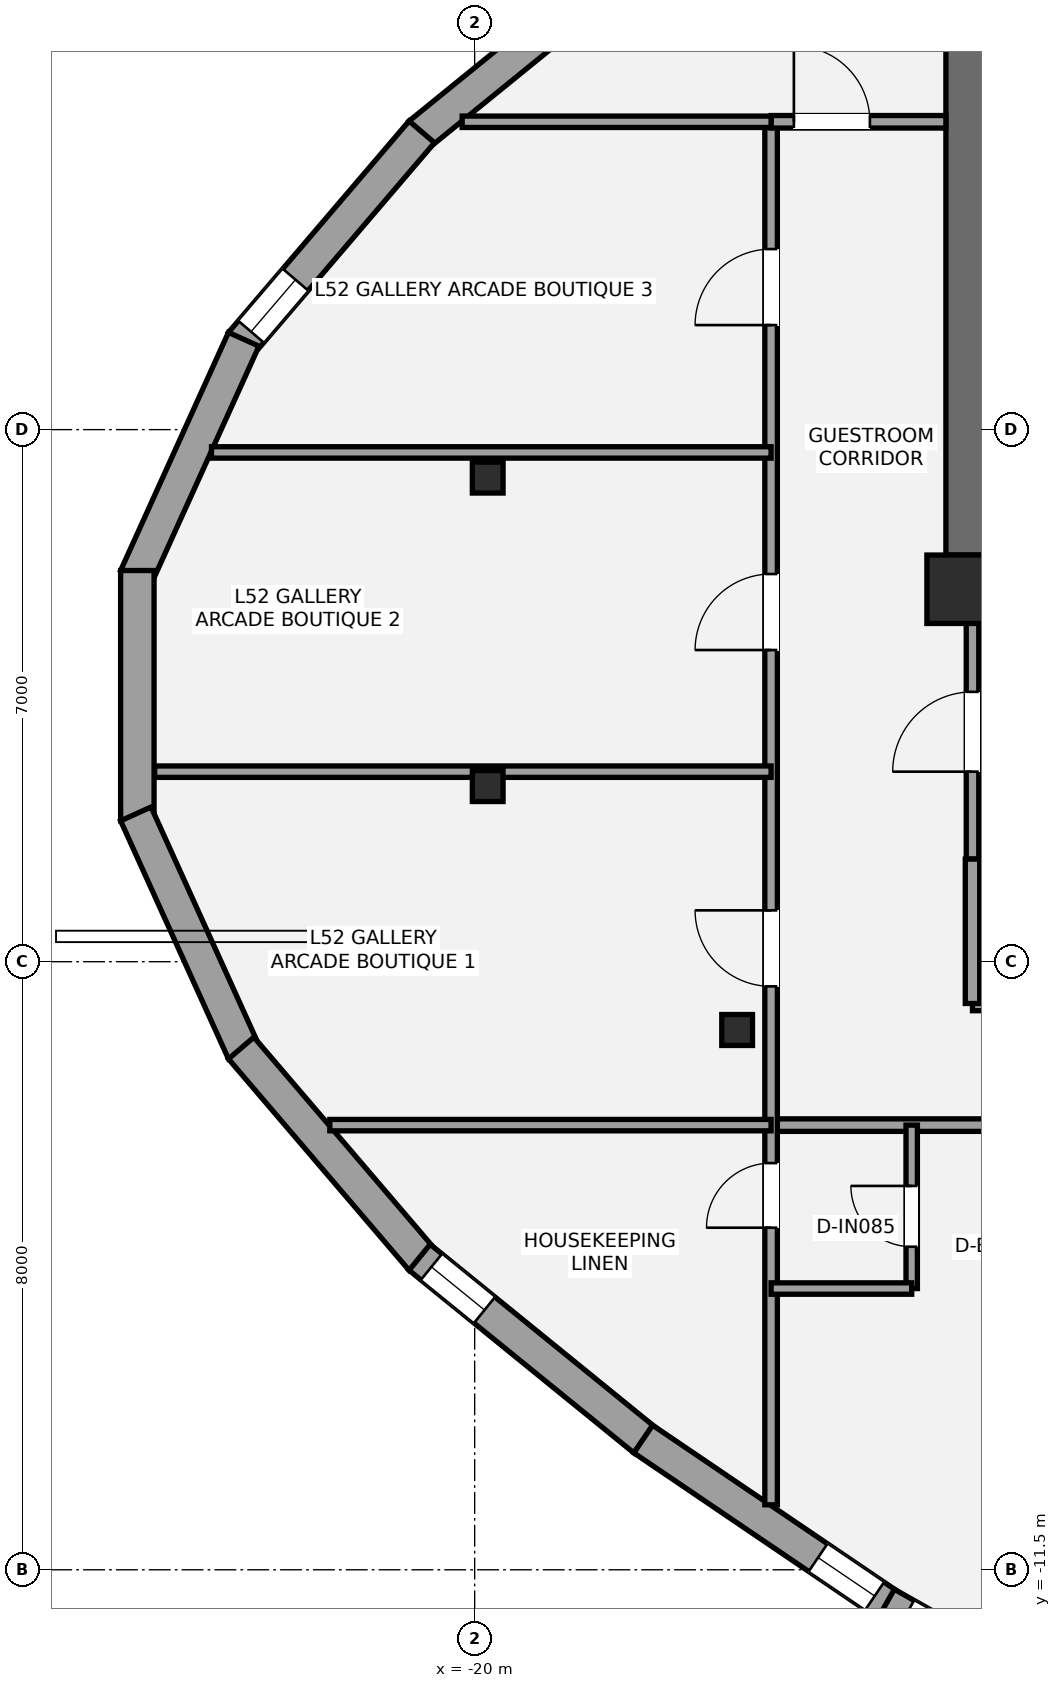
"""IFC4 building model, lengths in metres.
Left out: names, types, materials, properties, quantities, classifications, styles, units other than length and angle.
Written with IfcOpenShell. Run it as: python <this file> out.ifc"""

import sys

from ifc_helpers import new_model, si_unit, direction, frame, frame_2d, origin, origin_2d, place, context, subcontext, project, spatial, rectangle, i_section, extrude, element, fill, save


model = new_model("IFC4")
c1 = context("Model", 3, precision=1e-05, world=origin(), true_north=direction((0.0, 1.0)))
c2 = subcontext(c1, "Body", "Model", "MODEL_VIEW")
j1 = project(units=[si_unit("LENGTHUNIT", "METRE"), si_unit("PLANEANGLEUNIT", "RADIAN")], contexts=[c1])
p1 = place(None, origin())
s1 = spatial("IfcSite", under=j1, at=p1, CompositionType="ELEMENT")
p2 = place(p1, origin())
s2 = spatial("IfcBuilding", under=s1, at=p2, CompositionType="ELEMENT")
p3 = place(p2, frame((0.0, 0.0, 188.6)))
s3 = spatial("IfcBuildingStorey", under=s2, at=p3, CompositionType="ELEMENT", Elevation=188.6)
p4 = place(p3, frame((-13.475, 1.2, 0.0), z_axis=(0.0, 0.0, 1.0), x_axis=(0.0, 1.0, 0.0)))
e1 = element("IfcWall", 1, at=p4, inside=s3, PredefinedType="SHEAR", context=c2, shape_type="SweptSolid", body=[
    extrude(rectangle(XDim=8.45, YDim=0.65, at=frame_2d((4.225, 0.0))), origin(), (0.0, 0.0, 1.0), 3.2),
])
p5 = place(p3, frame((-4.875, 1.525, 0.0), z_axis=(0.0, 0.0, 1.0), x_axis=(-1.0, 0.0, 0.0)))
e2 = element("IfcWall", 2, at=p5, inside=s3, PredefinedType="SHEAR", context=c2, shape_type="SweptSolid", body=[
    extrude(rectangle(XDim=8.925, YDim=0.65, at=frame_2d((4.462, 0.0))), origin(), (0.0, 0.0, 1.0), 3.2),
])
p6 = place(p5, frame((5.425, 0.0, 0.0)))
e3 = element("IfcOpeningElement", 3, at=p6, cuts=e2, PredefinedType="OPENING", context=c2, shape_type="SweptSolid", body=[
    extrude(rectangle(XDim=1.05, YDim=2.15, at=frame_2d((0.525, 1.075))), frame((0.0, 0.335, 0.0), z_axis=(0.0, -1.0, 0.0), x_axis=(1.0, 0.0, 0.0)), (0.0, 0.0, 1.0), 0.67),
])
p7 = place(p5, frame((3.755, 0.0, 0.0)))
e4 = element("IfcOpeningElement", 4, at=p7, cuts=e2, PredefinedType="OPENING", context=c2, shape_type="SweptSolid", body=[
    extrude(rectangle(XDim=1.1, YDim=2.2, at=frame_2d((0.55, 1.1))), frame((0.0, 0.335, 0.0), z_axis=(0.0, -1.0, 0.0), x_axis=(1.0, 0.0, 0.0)), (0.0, 0.0, 1.0), 0.67),
])
p8 = place(p3, frame((-13.6, 1.4, 0.0), z_axis=(0.0, 0.0, 1.0), x_axis=(1.0, 0.0, 0.0)))
e5 = element("IfcColumn", 5, at=p8, inside=s3, PredefinedType="COLUMN", context=c2, shape_type="SweptSolid", body=[
    extrude(rectangle(XDim=0.9, YDim=0.9, at=origin_2d()), origin(), (0.0, 0.0, 1.0), 3.2),
])
for number, where, z_axis, x_axis in (
    (6, (-19.828, 2.869, 0.0), (0.0, 0.0, 1.0), (1.0, 0.0, 0.0)),
    (7, (-19.828, -1.189, 0.0), (0.0, 0.0, 1.0), (1.0, 0.0, 0.0)),
    (8, (-16.547, -4.398, 0.0), (0.0, 0.0, 1.0), (1.0, 0.0, 0.0)),
):
    element("IfcColumn", number, at=place(p3, frame(where, z_axis=z_axis, x_axis=x_axis)), inside=s3, PredefinedType="COLUMN", context=c2, shape_type="SweptSolid", body=[
        extrude(i_section(OverallWidth=0.404, OverallDepth=0.407, WebThickness=0.027, FlangeThickness=0.044, at=origin_2d()), origin(), (0.0, 0.0, 1.0), 3.2),
    ])
p9 = place(p3, frame((-20.724, 7.389, 0.0), z_axis=(0.0, 0.0, 1.0), x_axis=(0.776145361002, 0.63055402512, 0.0)))
e9 = element("IfcWall", 9, at=p9, inside=s3, PredefinedType="STANDARD", context=c2, shape_type="SweptSolid", body=[
    extrude(rectangle(XDim=3.81, YDim=0.44, at=frame_2d((1.905, 0.0))), origin(), (0.0, 0.0, 1.0), 2.315),
])
p10 = place(p9, frame((2.71, 0.0, 0.42)))
e10 = element("IfcOpeningElement", 10, at=p10, cuts=e9, PredefinedType="OPENING", context=c2, shape_type="SweptSolid", body=[
    extrude(rectangle(XDim=0.9, YDim=1.35, at=frame_2d((0.45, 0.675))), frame((0.0, 0.23, 0.0), z_axis=(0.0, -1.0, 0.0), x_axis=(1.0, 0.0, 0.0)), (0.0, 0.0, 1.0), 0.46),
])
p11 = place(p3, frame((-23.072, 4.636, 0.0), z_axis=(0.0, 0.0, 1.0), x_axis=(0.649641806751, 0.760240437573, 0.0)))
e11 = element("IfcWall", 11, at=p11, inside=s3, PredefinedType="STANDARD", context=c2, shape_type="SweptSolid", body=[
    extrude(rectangle(XDim=3.658, YDim=0.44, at=frame_2d((1.829, 0.0))), origin(), (0.0, 0.0, 1.0), 2.315),
])
p12 = place(p11, frame((0.2, 0.0, 0.42)))
e12 = element("IfcOpeningElement", 12, at=p12, cuts=e11, PredefinedType="OPENING", context=c2, shape_type="SweptSolid", body=[
    extrude(rectangle(XDim=0.9, YDim=1.35, at=frame_2d((0.45, 0.675))), frame((0.0, 0.23, 0.0), z_axis=(0.0, -1.0, 0.0), x_axis=(1.0, 0.0, 0.0)), (0.0, 0.0, 1.0), 0.46),
])
p13 = place(p3, frame((-24.458, 1.556, 0.0), z_axis=(0.0, 0.0, 1.0), x_axis=(0.412583132773, 0.91091995178, 0.0)))
e13 = element("IfcWall", 13, at=p13, inside=s3, PredefinedType="STANDARD", context=c2, shape_type="SweptSolid", body=[
    extrude(rectangle(XDim=3.439, YDim=0.44, at=frame_2d((1.72, 0.0))), origin(), (0.0, 0.0, 1.0), 2.315),
])
p14 = place(p3, frame((-24.438, -1.646, 0.0), z_axis=(0.0, 0.0, 1.0), x_axis=(0.0, 1.0, 0.0)))
e14 = element("IfcWall", 14, at=p14, inside=s3, PredefinedType="STANDARD", context=c2, shape_type="SweptSolid", body=[
    extrude(rectangle(XDim=3.293, YDim=0.44, at=frame_2d((1.646, 0.0))), origin(), (0.0, 0.0, 1.0), 2.315),
])
p15 = place(p3, frame((-23.039, -4.688, 0.0), z_axis=(0.0, 0.0, 1.0), x_axis=(-0.412583132773, 0.91091995178, 0.0)))
e15 = element("IfcWall", 15, at=p15, inside=s3, PredefinedType="STANDARD", context=c2, shape_type="SweptSolid", body=[
    extrude(rectangle(XDim=3.439, YDim=0.44, at=frame_2d((1.72, 0.0))), origin(), (0.0, 0.0, 1.0), 2.315),
])
p16 = place(p3, frame((-20.696, -7.417, 0.0), z_axis=(0.0, 0.0, 1.0), x_axis=(-0.649641806751, 0.760240437573, 0.0)))
e16 = element("IfcWall", 16, at=p16, inside=s3, PredefinedType="STANDARD", context=c2, shape_type="SweptSolid", body=[
    extrude(rectangle(XDim=3.658, YDim=0.44, at=frame_2d((1.829, 0.0))), origin(), (0.0, 0.0, 1.0), 2.315),
])
p17 = place(p3, frame((-17.767, -9.792, 0.0), z_axis=(0.0, 0.0, 1.0), x_axis=(-0.776145361002, 0.63055402512, 0.0)))
e17 = element("IfcWall", 17, at=p17, inside=s3, PredefinedType="STANDARD", context=c2, shape_type="SweptSolid", body=[
    extrude(rectangle(XDim=3.81, YDim=0.44, at=frame_2d((1.905, 0.0))), origin(), (0.0, 0.0, 1.0), 2.315),
])
p18 = place(p17, frame((2.71, 0.0, 0.58)))
e18 = element("IfcOpeningElement", 18, at=p18, cuts=e17, PredefinedType="OPENING", context=c2, shape_type="SweptSolid", body=[
    extrude(rectangle(XDim=0.9, YDim=1.35, at=frame_2d((0.45, 0.675))), frame((0.0, 0.23, 0.0), z_axis=(0.0, -1.0, 0.0), x_axis=(1.0, 0.0, 0.0)), (0.0, 0.0, 1.0), 0.46),
])
p19 = place(p3, frame((-14.571, -11.957, 0.0), z_axis=(0.0, 0.0, 1.0), x_axis=(-0.82772633423, 0.56113199483, 0.0)))
e19 = element("IfcWall", 19, at=p19, inside=s3, PredefinedType="STANDARD", context=c2, shape_type="SweptSolid", body=[
    extrude(rectangle(XDim=3.879, YDim=0.44, at=frame_2d((1.939, 0.0))), origin(), (0.0, 0.0, 1.0), 2.315),
])
p20 = place(p19, frame((0.2, 0.0, 0.58)))
e20 = element("IfcOpeningElement", 20, at=p20, cuts=e19, PredefinedType="OPENING", context=c2, shape_type="SweptSolid", body=[
    extrude(rectangle(XDim=0.9, YDim=1.35, at=frame_2d((0.45, 0.675))), frame((0.0, 0.23, 0.0), z_axis=(0.0, -1.0, 0.0), x_axis=(1.0, 0.0, 0.0)), (0.0, 0.0, 1.0), 0.46),
])
p21 = place(p3, frame((-11.043, -13.952, 0.0), z_axis=(0.0, 0.0, 1.0), x_axis=(-0.870346086449, 0.492440544434, 0.0)))
e21 = element("IfcWall", 21, at=p21, inside=s3, PredefinedType="STANDARD", context=c2, shape_type="SweptSolid", body=[
    extrude(rectangle(XDim=4.071, YDim=0.44, at=frame_2d((2.036, 0.0))), origin(), (0.0, 0.0, 1.0), 2.315),
])
p22 = place(p21, frame((2.872, 0.0, 0.58)))
e22 = element("IfcOpeningElement", 22, at=p22, cuts=e21, PredefinedType="OPENING", context=c2, shape_type="SweptSolid", body=[
    extrude(rectangle(XDim=0.9, YDim=1.35, at=frame_2d((0.45, 0.675))), frame((0.0, 0.23, 0.0), z_axis=(0.0, -1.0, 0.0), x_axis=(1.0, 0.0, 0.0)), (0.0, 0.0, 1.0), 0.46),
])
p23 = place(p3, frame((-13.45, -2.15, 0.0), z_axis=(0.0, 0.0, 1.0), x_axis=(1.0, 0.0, 0.0)))
e23 = element("IfcWall", 23, at=p23, inside=s3, PredefinedType="PARTITIONING", context=c2, shape_type="SweptSolid", body=[
    extrude(rectangle(XDim=6.25, YDim=0.165, at=frame_2d((3.125, 0.0))), origin(), (0.0, 0.0, 1.0), 3.02),
])
p24 = place(p3, frame((-13.45, -2.15, 0.0), z_axis=(0.0, 0.0, 1.0), x_axis=(0.0, 1.0, 0.0)))
e24 = element("IfcWall", 24, at=p24, inside=s3, PredefinedType="PARTITIONING", context=c2, shape_type="SweptSolid", body=[
    extrude(rectangle(XDim=3.4, YDim=0.165, at=frame_2d((1.7, 0.0))), origin(), (0.0, 0.0, 1.0), 2.473),
])
p25 = place(p24, frame((1.15, 0.0, 0.0)))
e25 = element("IfcOpeningElement", 25, at=p25, cuts=e24, PredefinedType="OPENING", context=c2, shape_type="SweptSolid", body=[
    extrude(rectangle(XDim=1.05, YDim=2.15, at=frame_2d((0.525, 1.075))), frame((0.0, 0.093, 0.0), z_axis=(0.0, -1.0, 0.0), x_axis=(1.0, 0.0, 0.0)), (0.0, 0.0, 1.0), 0.185),
])
p26 = place(p3, frame((-13.45, -4.05, 0.0), z_axis=(0.0, 0.0, 1.0), x_axis=(1.0, 0.0, 0.0)))
e26 = element("IfcWall", 26, at=p26, inside=s3, PredefinedType="PLUMBINGWALL", context=c2, shape_type="SweptSolid", body=[
    extrude(rectangle(XDim=11.35, YDim=0.19, at=frame_2d((5.675, 0.0))), origin(), (0.0, 0.0, 1.0), 2.473),
])
p27 = place(p26, frame((1.25, 0.0, 0.0)))
e27 = element("IfcOpeningElement", 27, at=p27, cuts=e26, PredefinedType="OPENING", context=c2, shape_type="SweptSolid", body=[
    extrude(rectangle(XDim=0.85, YDim=2.1, at=frame_2d((0.425, 1.05))), frame((0.0, 0.105, 0.0), z_axis=(0.0, -1.0, 0.0), x_axis=(1.0, 0.0, 0.0)), (0.0, 0.0, 1.0), 0.21),
])
p28 = place(p26, frame((5.1, 0.0, 0.0)))
e28 = element("IfcOpeningElement", 28, at=p28, cuts=e26, PredefinedType="OPENING", context=c2, shape_type="SweptSolid", body=[
    extrude(rectangle(XDim=0.85, YDim=2.1, at=frame_2d((0.425, 1.05))), frame((0.0, 0.105, 0.0), z_axis=(0.0, -1.0, 0.0), x_axis=(1.0, 0.0, 0.0)), (0.0, 0.0, 1.0), 0.21),
])
p29 = place(p26, frame((8.95, 0.0, 0.0)))
e29 = element("IfcOpeningElement", 29, at=p29, cuts=e26, PredefinedType="OPENING", context=c2, shape_type="SweptSolid", body=[
    extrude(rectangle(XDim=0.95, YDim=2.15, at=frame_2d((0.475, 1.075))), frame((0.0, 0.105, 0.0), z_axis=(0.0, -1.0, 0.0), x_axis=(1.0, 0.0, 0.0)), (0.0, 0.0, 1.0), 0.21),
])
p30 = place(p3, frame((-13.45, -4.05, 0.0), z_axis=(0.0, 0.0, 1.0), x_axis=(0.0, 1.0, 0.0)))
e30 = element("IfcWall", 30, at=p30, inside=s3, PredefinedType="PLUMBINGWALL", context=c2, shape_type="SweptSolid", body=[
    extrude(rectangle(XDim=1.9, YDim=0.19, at=frame_2d((0.95, 0.0))), origin(), (0.0, 0.0, 1.0), 2.473),
])
p31 = place(p3, frame((-16.1, -5.65, 0.0), z_axis=(0.0, 0.0, 1.0), x_axis=(1.0, 0.0, 0.0)))
e31 = element("IfcWall", 31, at=p31, inside=s3, PredefinedType="PARTITIONING", context=c2, shape_type="SweptSolid", body=[
    extrude(rectangle(XDim=31.65, YDim=0.165, at=frame_2d((15.825, 0.0))), origin(), (0.0, 0.0, 1.0), 2.398),
])
p32 = place(p31, frame((8.95, 0.0, 0.0)))
e32 = element("IfcOpeningElement", 32, at=p32, cuts=e31, PredefinedType="OPENING", context=c2, shape_type="SweptSolid", body=[
    extrude(rectangle(XDim=0.95, YDim=2.15, at=frame_2d((0.475, 1.075))), frame((0.0, 0.093, 0.0), z_axis=(0.0, -1.0, 0.0), x_axis=(1.0, 0.0, 0.0)), (0.0, 0.0, 1.0), 0.185),
])
p33 = place(p31, frame((18.95, 0.0, 0.0)))
e33 = element("IfcOpeningElement", 33, at=p33, cuts=e31, PredefinedType="OPENING", context=c2, shape_type="SweptSolid", body=[
    extrude(rectangle(XDim=0.95, YDim=2.15, at=frame_2d((0.475, 1.075))), frame((0.0, 0.093, 0.0), z_axis=(0.0, -1.0, 0.0), x_axis=(1.0, 0.0, 0.0)), (0.0, 0.0, 1.0), 0.185),
])
p34 = place(p31, frame((30.3, 0.0, 0.0)))
e34 = element("IfcOpeningElement", 34, at=p34, cuts=e31, PredefinedType="OPENING", context=c2, shape_type="SweptSolid", body=[
    extrude(rectangle(XDim=0.95, YDim=2.15, at=frame_2d((0.475, 1.075))), frame((0.0, 0.093, 0.0), z_axis=(0.0, -1.0, 0.0), x_axis=(1.0, 0.0, 0.0)), (0.0, 0.0, 1.0), 0.185),
])
p35 = place(p3, frame((-16.1, -10.645, 0.0), z_axis=(0.0, 0.0, 1.0), x_axis=(0.0, 1.0, 0.0)))
e35 = element("IfcWall", 35, at=p35, inside=s3, PredefinedType="PARTITIONING", context=c2, shape_type="SweptSolid", body=[
    extrude(rectangle(XDim=18.195, YDim=0.165, at=frame_2d((9.098, 0.0))), origin(), (0.0, 0.0, 1.0), 2.473),
])
p36 = place(p35, frame((3.646, 0.0, 0.0)))
e36 = element("IfcOpeningElement", 36, at=p36, cuts=e35, PredefinedType="OPENING", context=c2, shape_type="SweptSolid", body=[
    extrude(rectangle(XDim=0.85, YDim=2.1, at=frame_2d((0.425, 1.05))), frame((0.0, 0.093, 0.0), z_axis=(0.0, -1.0, 0.0), x_axis=(1.0, 0.0, 0.0)), (0.0, 0.0, 1.0), 0.185),
])
p37 = place(p35, frame((6.821, 0.0, 0.0)))
e37 = element("IfcOpeningElement", 37, at=p37, cuts=e35, PredefinedType="OPENING", context=c2, shape_type="SweptSolid", body=[
    extrude(rectangle(XDim=1.0, YDim=2.15, at=frame_2d((0.5, 1.075))), frame((0.0, 0.093, 0.0), z_axis=(0.0, -1.0, 0.0), x_axis=(1.0, 0.0, 0.0)), (0.0, 0.0, 1.0), 0.185),
])
p38 = place(p35, frame((11.246, 0.0, 0.0)))
e38 = element("IfcOpeningElement", 38, at=p38, cuts=e35, PredefinedType="OPENING", context=c2, shape_type="SweptSolid", body=[
    extrude(rectangle(XDim=1.0, YDim=2.15, at=frame_2d((0.5, 1.075))), frame((0.0, 0.093, 0.0), z_axis=(0.0, -1.0, 0.0), x_axis=(1.0, 0.0, 0.0)), (0.0, 0.0, 1.0), 0.185),
])
p39 = place(p35, frame((15.521, 0.0, 0.0)))
e39 = element("IfcOpeningElement", 39, at=p39, cuts=e35, PredefinedType="OPENING", context=c2, shape_type="SweptSolid", body=[
    extrude(rectangle(XDim=1.0, YDim=2.15, at=frame_2d((0.5, 1.075))), frame((0.0, 0.093, 0.0), z_axis=(0.0, -1.0, 0.0), x_axis=(1.0, 0.0, 0.0)), (0.0, 0.0, 1.0), 0.185),
])
p40 = place(p3, frame((-16.1, 7.55, 0.0), z_axis=(0.0, 0.0, 1.0), x_axis=(1.0, 0.0, 0.0)))
e40 = element("IfcWall", 40, at=p40, inside=s3, PredefinedType="PARTITIONING", context=c2, shape_type="SweptSolid", body=[
    extrude(rectangle(XDim=2.3, YDim=0.165, at=frame_2d((1.15, 0.0))), origin(), (0.0, 0.0, 1.0), 2.473),
])
p41 = place(p40, frame((0.3, 0.0, 0.0)))
e41 = element("IfcOpeningElement", 41, at=p41, cuts=e40, PredefinedType="OPENING", context=c2, shape_type="SweptSolid", body=[
    extrude(rectangle(XDim=1.0, YDim=2.15, at=frame_2d((0.5, 1.075))), frame((0.0, 0.093, 0.0), z_axis=(0.0, -1.0, 0.0), x_axis=(1.0, 0.0, 0.0)), (0.0, 0.0, 1.0), 0.185),
])
p42 = place(p3, frame((-20.165, 7.55, 0.0), z_axis=(0.0, 0.0, 1.0), x_axis=(1.0, 0.0, 0.0)))
e42 = element("IfcWall", 42, at=p42, inside=s3, PredefinedType="PLUMBINGWALL", context=c2, shape_type="SweptSolid", body=[
    extrude(rectangle(XDim=4.065, YDim=0.15, at=frame_2d((2.032, 0.0))), origin(), (0.0, 0.0, 1.0), 2.473),
])
p43 = place(p3, frame((-21.906, -5.65, 0.0), z_axis=(0.0, 0.0, 1.0), x_axis=(1.0, 0.0, 0.0)))
e43 = element("IfcWall", 43, at=p43, inside=s3, PredefinedType="PLUMBINGWALL", context=c2, shape_type="SweptSolid", body=[
    extrude(rectangle(XDim=5.806, YDim=0.15, at=frame_2d((2.903, 0.0))), origin(), (0.0, 0.0, 1.0), 2.473),
])
p44 = place(p3, frame((-14.25, -7.8, 0.0), z_axis=(0.0, 0.0, 1.0), x_axis=(0.0, 1.0, 0.0)))
e44 = element("IfcWall", 44, at=p44, inside=s3, PredefinedType="PLUMBINGWALL", context=c2, shape_type="SweptSolid", body=[
    extrude(rectangle(XDim=2.15, YDim=0.15, at=frame_2d((1.075, 0.0))), origin(), (0.0, 0.0, 1.0), 2.473),
])
p45 = place(p44, frame((0.55, 0.0, 0.0)))
e45 = element("IfcOpeningElement", 45, at=p45, cuts=e44, PredefinedType="OPENING", context=c2, shape_type="SweptSolid", body=[
    extrude(rectangle(XDim=0.8, YDim=2.1, at=frame_2d((0.4, 1.05))), frame((0.0, 0.085, 0.0), z_axis=(0.0, -1.0, 0.0), x_axis=(1.0, 0.0, 0.0)), (0.0, 0.0, 1.0), 0.17),
])
p46 = place(p3, frame((-16.1, -7.8, 0.0), z_axis=(0.0, 0.0, 1.0), x_axis=(1.0, 0.0, 0.0)))
e46 = element("IfcWall", 46, at=p46, inside=s3, PredefinedType="PLUMBINGWALL", context=c2, shape_type="SweptSolid", body=[
    extrude(rectangle(XDim=1.85, YDim=0.15, at=frame_2d((0.925, 0.0))), origin(), (0.0, 0.0, 1.0), 2.473),
])
p47 = place(p3, frame((-24.21, -1.0, 0.0), z_axis=(0.0, 0.0, 1.0), x_axis=(1.0, 0.0, 0.0)))
e47 = element("IfcWall", 47, at=p47, inside=s3, PredefinedType="PLUMBINGWALL", context=c2, shape_type="SweptSolid", body=[
    extrude(rectangle(XDim=8.11, YDim=0.15, at=frame_2d((4.055, 0.0))), origin(), (0.0, 0.0, 1.0), 2.473),
])
p48 = place(p3, frame((-23.463, 3.2, 0.0), z_axis=(0.0, 0.0, 1.0), x_axis=(1.0, 0.0, 0.0)))
e48 = element("IfcWall", 48, at=p48, inside=s3, PredefinedType="PLUMBINGWALL", context=c2, shape_type="SweptSolid", body=[
    extrude(rectangle(XDim=7.363, YDim=0.15, at=frame_2d((3.681, 0.0))), origin(), (0.0, 0.0, 1.0), 2.473),
])
p49 = place(p12, origin())
e49 = element("IfcWindow", 49, at=p49, inside=s3, PartitioningType="SINGLE_PANEL", PredefinedType="WINDOW", context=c2, shape_type="SweptSolid", body=[
    extrude(rectangle(XDim=0.9, YDim=1.35, at=frame_2d((0.45, 0.675))), frame((0.0, -0.01, 0.0), z_axis=(0.0, -1.0, 0.0), x_axis=(1.0, 0.0, 0.0)), (0.0, 0.0, 1.0), 0.06),
])
fill(e12, e49)
p50 = place(p18, origin())
e50 = element("IfcWindow", 50, at=p50, inside=s3, PartitioningType="SINGLE_PANEL", PredefinedType="WINDOW", context=c2, shape_type="SweptSolid", body=[
    extrude(rectangle(XDim=0.9, YDim=1.35, at=frame_2d((0.45, 0.675))), frame((0.0, -0.01, 0.0), z_axis=(0.0, -1.0, 0.0), x_axis=(1.0, 0.0, 0.0)), (0.0, 0.0, 1.0), 0.06),
])
fill(e18, e50)
p51 = place(p20, origin())
e51 = element("IfcWindow", 51, at=p51, inside=s3, PartitioningType="SINGLE_PANEL", PredefinedType="WINDOW", context=c2, shape_type="SweptSolid", body=[
    extrude(rectangle(XDim=0.9, YDim=1.35, at=frame_2d((0.45, 0.675))), frame((0.0, -0.01, 0.0), z_axis=(0.0, -1.0, 0.0), x_axis=(1.0, 0.0, 0.0)), (0.0, 0.0, 1.0), 0.06),
])
fill(e20, e51)
p52 = place(p25, origin())
e52 = element("IfcDoor", 52, at=p52, inside=s3, OperationType="SINGLE_SWING_LEFT", PredefinedType="DOOR", context=c2, shape_type="SweptSolid", body=[
    extrude(rectangle(XDim=1.05, YDim=2.15, at=frame_2d((0.525, 1.075))), frame((0.0, 0.025, 0.0), z_axis=(0.0, -1.0, 0.0), x_axis=(1.0, 0.0, 0.0)), (0.0, 0.0, 1.0), 0.05),
])
fill(e25, e52)
p53 = place(p41, origin())
e53 = element("IfcDoor", 53, at=p53, inside=s3, OperationType="SINGLE_SWING_LEFT", PredefinedType="DOOR", context=c2, shape_type="SweptSolid", body=[
    extrude(rectangle(XDim=1.0, YDim=2.15, at=frame_2d((0.5, 1.075))), frame((0.0, 0.025, 0.0), z_axis=(0.0, -1.0, 0.0), x_axis=(1.0, 0.0, 0.0)), (0.0, 0.0, 1.0), 0.05),
])
fill(e41, e53)
p54 = place(p36, origin())
e54 = element("IfcDoor", 54, at=p54, inside=s3, OperationType="SINGLE_SWING_LEFT", PredefinedType="DOOR", context=c2, shape_type="SweptSolid", body=[
    extrude(rectangle(XDim=0.85, YDim=2.1, at=frame_2d((0.425, 1.05))), frame((0.0, 0.025, 0.0), z_axis=(0.0, -1.0, 0.0), x_axis=(1.0, 0.0, 0.0)), (0.0, 0.0, 1.0), 0.05),
])
fill(e36, e54)
p55 = place(p45, origin())
e55 = element("IfcDoor", 55, at=p55, inside=s3, OperationType="SINGLE_SWING_RIGHT", PredefinedType="DOOR", context=c2, shape_type="SweptSolid", body=[
    extrude(rectangle(XDim=0.8, YDim=2.1, at=frame_2d((0.4, 1.05))), frame((0.0, 0.025, 0.0), z_axis=(0.0, -1.0, 0.0), x_axis=(1.0, 0.0, 0.0)), (0.0, 0.0, 1.0), 0.05),
])
fill(e45, e55)
p56 = place(p37, origin())
e56 = element("IfcDoor", 56, at=p56, inside=s3, OperationType="SINGLE_SWING_RIGHT", PredefinedType="DOOR", context=c2, shape_type="SweptSolid", body=[
    extrude(rectangle(XDim=1.0, YDim=2.15, at=frame_2d((0.5, 1.075))), frame((0.0, 0.025, 0.0), z_axis=(0.0, -1.0, 0.0), x_axis=(1.0, 0.0, 0.0)), (0.0, 0.0, 1.0), 0.05),
])
fill(e37, e56)
p57 = place(p38, origin())
e57 = element("IfcDoor", 57, at=p57, inside=s3, OperationType="SINGLE_SWING_LEFT", PredefinedType="DOOR", context=c2, shape_type="SweptSolid", body=[
    extrude(rectangle(XDim=1.0, YDim=2.15, at=frame_2d((0.5, 1.075))), frame((0.0, 0.025, 0.0), z_axis=(0.0, -1.0, 0.0), x_axis=(1.0, 0.0, 0.0)), (0.0, 0.0, 1.0), 0.05),
])
fill(e38, e57)
p58 = place(p39, origin())
e58 = element("IfcDoor", 58, at=p58, inside=s3, OperationType="SINGLE_SWING_LEFT", PredefinedType="DOOR", context=c2, shape_type="SweptSolid", body=[
    extrude(rectangle(XDim=1.0, YDim=2.15, at=frame_2d((0.5, 1.075))), frame((0.0, 0.025, 0.0), z_axis=(0.0, -1.0, 0.0), x_axis=(1.0, 0.0, 0.0)), (0.0, 0.0, 1.0), 0.05),
])
fill(e39, e58)
save(model, sys.argv[1])
